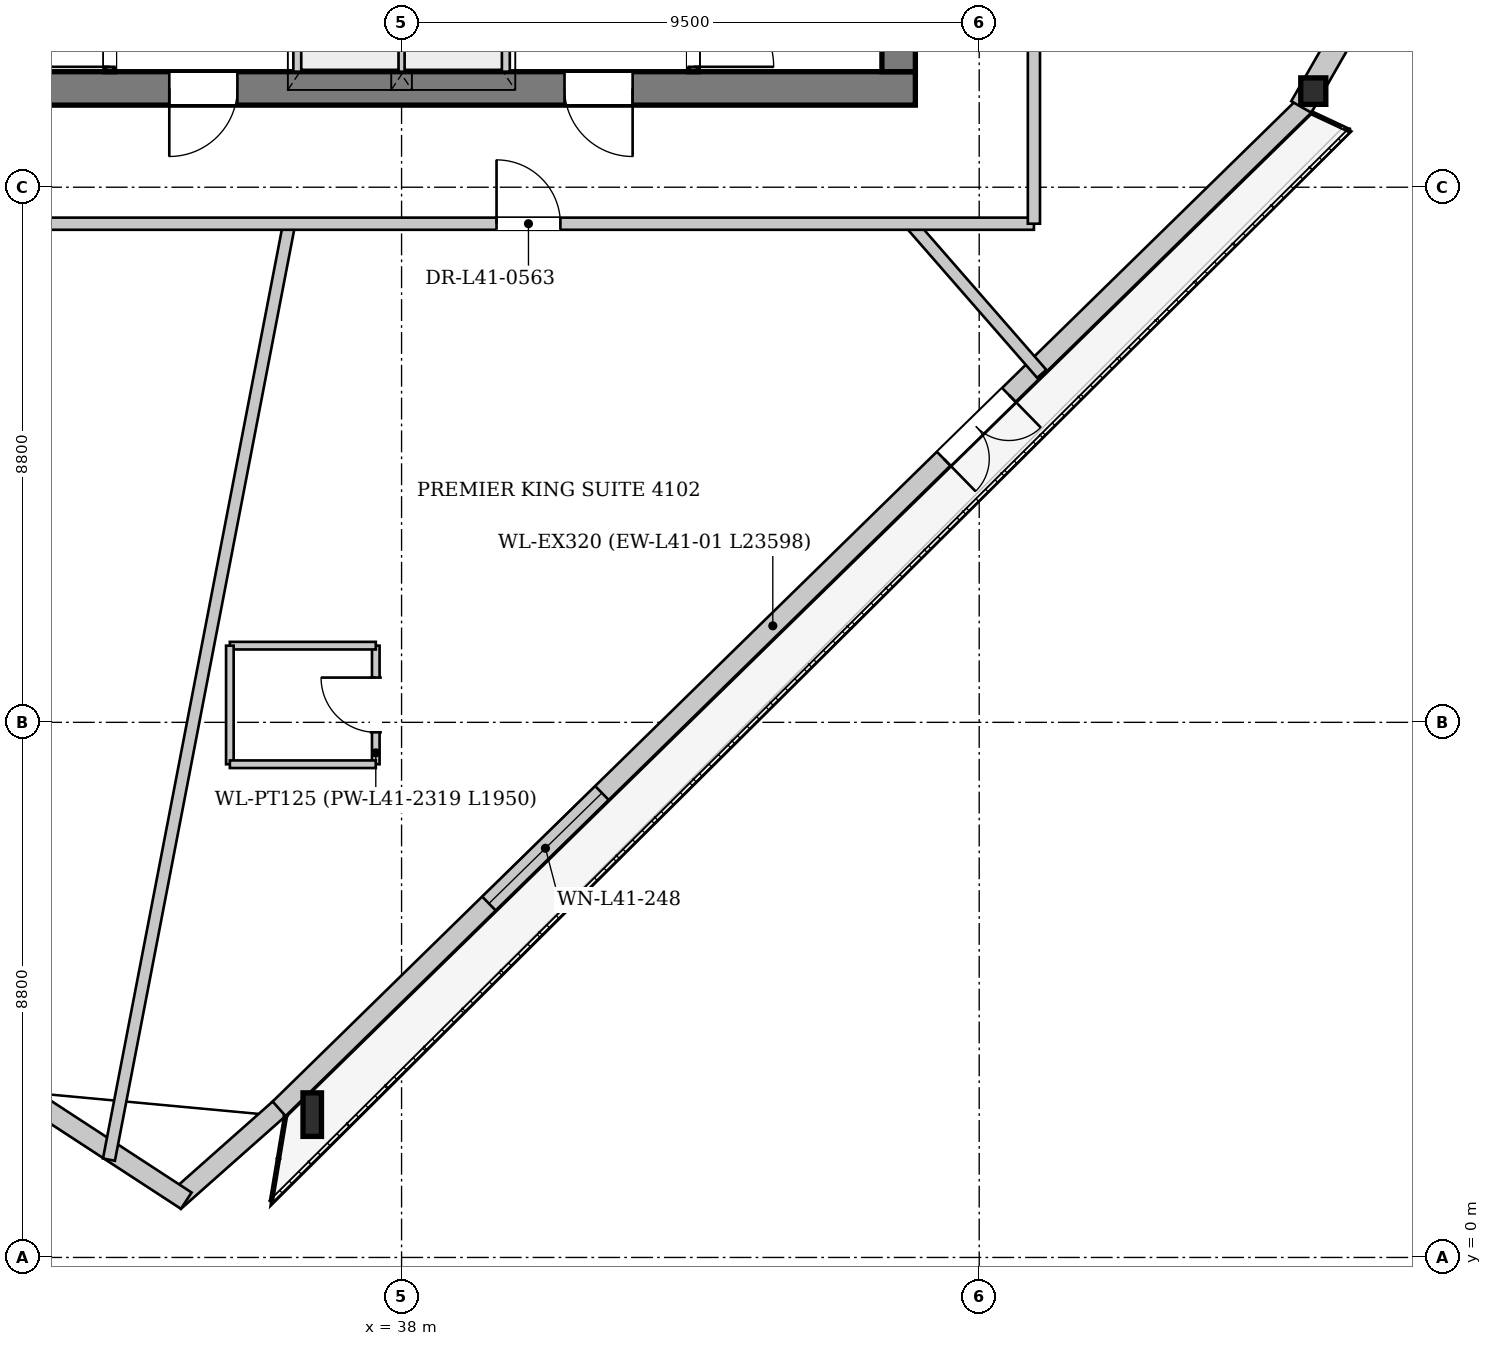
"""IFC4 building model, lengths in metres.
Left out: names, types, materials, properties, quantities, classifications, styles, units other than length and angle.
Written with IfcOpenShell. Run it as: python <this file> out.ifc"""

import sys

from ifc_helpers import new_model, si_unit, direction, frame, frame_2d, origin, origin_2d, place, context, subcontext, project, spatial, rectangle, i_section, extrude, source, transform, mapped, element, fill, save


model = new_model("IFC4")
c1 = context("Model", 3, precision=1e-05, world=origin(), true_north=direction((0.0, 1.0)))
c2 = subcontext(c1, "Body", "Model", "MODEL_VIEW")
j1 = project(units=[si_unit("LENGTHUNIT", "METRE"), si_unit("PLANEANGLEUNIT", "RADIAN")], contexts=[c1])
p1 = place(None, origin())
s1 = spatial("IfcSite", under=j1, at=p1, CompositionType="ELEMENT")
p2 = place(p1, origin())
s2 = spatial("IfcBuilding", under=s1, at=p2, CompositionType="ELEMENT")
p3 = place(p2, frame((0.0, 0.0, 157.25)))
s3 = spatial("IfcBuildingStorey", under=s2, at=p3, CompositionType="ELEMENT", Elevation=157.25)
m1 = source(origin(), c2, "Body", "SweptSolid", [
    extrude(i_section(OverallWidth=0.304, OverallDepth=0.716, WebThickness=0.021, FlangeThickness=0.04, at=origin_2d()), origin(), (0.0, 0.0, 1.0), 3.538),
])
p4 = place(p3, frame((31.361, 2.764, 0.0), z_axis=(0.287715041791, -0.040372583221, 0.956864728816), x_axis=(0.138960020448, 0.990297991878, 0.0)))
e1 = element("IfcColumn", 1, at=p4, inside=s3, PredefinedType="COLUMN", context=c2, shape_type="MappedRepresentation", body=[
    mapped(m1, transform((0.0, 0.0, 0.0), x_axis=(1.0, 0.0, 0.0), y_axis=(0.0, 1.0, 0.0), z_axis=(0.0, 0.0, 1.0), scale=1.0)),
])
m2 = source(origin(), c2, "Body", "SweptSolid", [
    extrude(i_section(OverallWidth=0.304, OverallDepth=0.716, WebThickness=0.021, FlangeThickness=0.04, at=origin_2d()), origin(), (0.0, 0.0, 1.0), 3.497),
])
p5 = place(p3, frame((36.092, 2.325, 0.0), z_axis=(0.251028780295, 0.013542709504, 0.967884882867), x_axis=(-0.05387049459, 0.998547930654, 0.0)))
e2 = element("IfcColumn", 2, at=p5, inside=s3, PredefinedType="COLUMN", context=c2, shape_type="MappedRepresentation", body=[
    mapped(m2, transform((0.0, 0.0, 0.0), x_axis=(1.0, 0.0, 0.0), y_axis=(0.0, 1.0, 0.0), z_axis=(0.0, 0.0, 1.0), scale=1.0)),
])
m3 = source(origin(), c2, "Body", "SweptSolid", [
    extrude(i_section(OverallWidth=0.412, OverallDepth=0.435, WebThickness=0.031, FlangeThickness=0.05, at=origin_2d()), origin(), (0.0, 0.0, 1.0), 3.459),
])
p6 = place(p3, frame((52.962, 18.826, 0.0), z_axis=(0.018843973792, 0.205166411286, 0.978545680248), x_axis=(-0.995808540484, 0.091462291128, 0.0)))
e3 = element("IfcColumn", 3, at=p6, inside=s3, PredefinedType="COLUMN", context=c2, shape_type="MappedRepresentation", body=[
    mapped(m3, transform((0.0, 0.0, 0.0), x_axis=(1.0, 0.0, 0.0), y_axis=(0.0, 1.0, 0.0), z_axis=(0.0, 0.0, 1.0), scale=1.0)),
])
p7 = place(p3, frame((52.85, 18.94, 0.0), z_axis=(0.0, 0.0, 1.0), x_axis=(-0.714884953244, -0.699242092287, 0.0)))
e4 = element("IfcWall", 4, at=p7, inside=s3, PredefinedType="SOLIDWALL", context=c2, shape_type="SweptSolid", body=[
    extrude(rectangle(XDim=23.598, YDim=0.32, at=frame_2d((11.799, 0.0))), origin(), (0.0, 0.0, 1.0), 2.722),
])
p8 = place(p7, frame((6.801, 0.0, 0.0)))
e5 = element("IfcOpeningElement", 5, at=p8, cuts=e4, PredefinedType="OPENING", context=c2, shape_type="SweptSolid", body=[
    extrude(rectangle(XDim=1.5, YDim=2.3, at=frame_2d((0.75, 1.15))), frame((0.0, 0.17, 0.0), z_axis=(0.0, -1.0, 0.0), x_axis=(1.0, 0.0, 0.0)), (0.0, 0.0, 1.0), 0.34),
])
p9 = place(p7, frame((16.163, 0.0, 0.252)))
e6 = element("IfcOpeningElement", 6, at=p9, cuts=e4, PredefinedType="OPENING", context=c2, shape_type="SweptSolid", body=[
    extrude(rectangle(XDim=2.6, YDim=2.35, at=frame_2d((1.3, 1.175))), frame((0.0, 0.17, 0.0), z_axis=(0.0, -1.0, 0.0), x_axis=(1.0, 0.0, 0.0)), (0.0, 0.0, 1.0), 0.34),
])
p10 = place(p3, frame((35.986, 2.445, 0.0), z_axis=(0.0, 0.0, 1.0), x_axis=(-0.748310994166, -0.663348065506, 0.0)))
e7 = element("IfcWall", 7, at=p10, inside=s3, PredefinedType="SOLIDWALL", context=c2, shape_type="SweptSolid", body=[
    extrude(rectangle(XDim=2.299, YDim=0.32, at=frame_2d((1.149, 0.0))), origin(), (0.0, 0.0, 1.0), 2.722),
])
p11 = place(p3, frame((34.459, 0.934, 0.0), z_axis=(0.0, 0.0, 1.0), x_axis=(-0.837598435758, 0.546286427084, 0.0)))
e8 = element("IfcWall", 8, at=p11, inside=s3, PredefinedType="SOLIDWALL", context=c2, shape_type="SweptSolid", body=[
    extrude(rectangle(XDim=3.594, YDim=0.32, at=frame_2d((1.797, 0.0))), origin(), (0.0, 0.0, 1.0), 2.722),
])
p12 = place(p3, frame((64.549, 39.384, 0.0), z_axis=(0.0, 0.0, 1.0), x_axis=(-0.49798956696, -0.867183020589, 0.0)))
e9 = element("IfcWall", 9, at=p12, inside=s3, PredefinedType="SOLIDWALL", context=c2, shape_type="SweptSolid", body=[
    extrude(rectangle(XDim=23.598, YDim=0.38, at=frame_2d((11.799, 0.0))), origin(), (0.0, 0.0, 1.0), 2.722),
])
p13 = place(p12, frame((5.507, 0.0, 0.352)))
e10 = element("IfcOpeningElement", 10, at=p13, cuts=e9, PredefinedType="OPENING", context=c2, shape_type="SweptSolid", body=[
    extrude(rectangle(XDim=2.2, YDim=2.25, at=frame_2d((1.1, 1.125))), frame((0.0, 0.2, 0.0), z_axis=(0.0, -1.0, 0.0), x_axis=(1.0, 0.0, 0.0)), (0.0, 0.0, 1.0), 0.4),
])
p14 = place(p12, frame((15.891, 0.0, 0.352)))
e11 = element("IfcOpeningElement", 11, at=p14, cuts=e9, PredefinedType="OPENING", context=c2, shape_type="SweptSolid", body=[
    extrude(rectangle(XDim=2.2, YDim=2.25, at=frame_2d((1.1, 1.125))), frame((0.0, 0.2, 0.0), z_axis=(0.0, -1.0, 0.0), x_axis=(1.0, 0.0, 0.0)), (0.0, 0.0, 1.0), 0.4),
])
p15 = place(p3, frame((46.45, 19.225, 0.0), z_axis=(0.0, 0.0, 1.0), x_axis=(-1.0, 0.0, 0.0)))
e12 = element("IfcWall", 12, at=p15, inside=s3, PredefinedType="SHEAR", context=c2, shape_type="SweptSolid", body=[
    extrude(rectangle(XDim=16.9, YDim=0.55, at=frame_2d((8.45, 0.0))), origin(), (0.0, 0.0, 1.0), 3.33),
])
p16 = place(p15, frame((4.65, 0.0, 0.0)))
e13 = element("IfcOpeningElement", 13, at=p16, cuts=e12, PredefinedType="OPENING", context=c2, shape_type="SweptSolid", body=[
    extrude(rectangle(XDim=1.12, YDim=2.25, at=frame_2d((0.56, 1.125))), frame((0.0, 0.285, 0.0), z_axis=(0.0, -1.0, 0.0), x_axis=(1.0, 0.0, 0.0)), (0.0, 0.0, 1.0), 0.57),
])
p17 = place(p15, frame((11.15, 0.0, 0.0)))
e14 = element("IfcOpeningElement", 14, at=p17, cuts=e12, PredefinedType="OPENING", context=c2, shape_type="SweptSolid", body=[
    extrude(rectangle(XDim=1.12, YDim=2.25, at=frame_2d((0.56, 1.125))), frame((0.0, 0.285, 0.0), z_axis=(0.0, -1.0, 0.0), x_axis=(1.0, 0.0, 0.0)), (0.0, 0.0, 1.0), 0.57),
])
p18 = place(p3, frame((46.175, 33.7, 0.0), z_axis=(0.0, 0.0, 1.0), x_axis=(0.0, -1.0, 0.0)))
e15 = element("IfcWall", 15, at=p18, inside=s3, PredefinedType="SHEAR", context=c2, shape_type="SweptSolid", body=[
    extrude(rectangle(XDim=14.2, YDim=0.55, at=frame_2d((7.1, 0.0))), origin(), (0.0, 0.0, 1.0), 3.33),
])
p19 = place(p18, frame((5.18, 0.0, 0.0)))
e16 = element("IfcOpeningElement", 16, at=p19, cuts=e15, PredefinedType="OPENING", context=c2, shape_type="SweptSolid", body=[
    extrude(rectangle(XDim=1.6, YDim=2.2, at=frame_2d((0.8, 1.1))), frame((0.0, 0.285, 0.0), z_axis=(0.0, -1.0, 0.0), x_axis=(1.0, 0.0, 0.0)), (0.0, 0.0, 1.0), 0.57),
])
p20 = place(p18, frame((2.05, 0.0, 0.0)))
e17 = element("IfcOpeningElement", 17, at=p20, cuts=e15, PredefinedType="OPENING", context=c2, shape_type="SweptSolid", body=[
    extrude(rectangle(XDim=0.95, YDim=2.1, at=frame_2d((0.475, 1.05))), frame((0.0, 0.285, 0.0), z_axis=(0.0, -1.0, 0.0), x_axis=(1.0, 0.0, 0.0)), (0.0, 0.0, 1.0), 0.57),
])
p21 = place(p3, frame((33.2, 19.5, 0.0), z_axis=(0.0, 0.0, 1.0), x_axis=(0.0, 1.0, 0.0)))
e18 = element("IfcWall", 18, at=p21, inside=s3, PredefinedType="PARTITIONING", context=c2, shape_type="SweptSolid", body=[
    extrude(rectangle(XDim=7.46, YDim=0.16, at=frame_2d((3.73, 0.0))), origin(), (0.0, 0.0, 1.0), 3.33),
])
p22 = place(p21, frame((0.08, 0.0, 0.0)))
e19 = element("IfcOpeningElement", 19, at=p22, cuts=e18, PredefinedType="OPENING", context=c2, shape_type="SweptSolid", body=[
    extrude(rectangle(XDim=1.32, YDim=2.2, at=frame_2d((0.66, 1.1))), frame((0.0, 0.09, 0.0), z_axis=(0.0, -1.0, 0.0), x_axis=(1.0, 0.0, 0.0)), (0.0, 0.0, 1.0), 0.18),
])
p23 = place(p3, frame((42.8, 26.96, 0.0), z_axis=(0.0, 0.0, 1.0), x_axis=(0.0, -1.0, 0.0)))
e20 = element("IfcWall", 20, at=p23, inside=s3, PredefinedType="PARTITIONING", context=c2, shape_type="SweptSolid", body=[
    extrude(rectangle(XDim=7.46, YDim=0.16, at=frame_2d((3.73, 0.0))), origin(), (0.0, 0.0, 1.0), 3.33),
])
p24 = place(p23, frame((6.06, 0.0, 0.0)))
e21 = element("IfcOpeningElement", 21, at=p24, cuts=e20, PredefinedType="OPENING", context=c2, shape_type="SweptSolid", body=[
    extrude(rectangle(XDim=1.32, YDim=2.2, at=frame_2d((0.66, 1.1))), frame((0.0, 0.09, 0.0), z_axis=(0.0, -1.0, 0.0), x_axis=(1.0, 0.0, 0.0)), (0.0, 0.0, 1.0), 0.18),
])
p25 = place(p3, frame((36.3, 19.5, 0.0), z_axis=(0.0, 0.0, 1.0), x_axis=(0.0, 1.0, 0.0)))
e22 = element("IfcWall", 22, at=p25, inside=s3, PredefinedType="PARTITIONING", context=c2, shape_type="SweptSolid", body=[
    extrude(rectangle(XDim=4.78, YDim=0.16, at=frame_2d((2.39, 0.0))), origin(), (0.0, 0.0, 1.0), 3.33),
])
p26 = place(p25, frame((0.6, 0.0, 0.0)))
e23 = element("IfcOpeningElement", 23, at=p26, cuts=e22, PredefinedType="OPENING", context=c2, shape_type="SweptSolid", body=[
    extrude(rectangle(XDim=1.2, YDim=2.2, at=frame_2d((0.6, 1.1))), frame((0.0, 0.09, 0.0), z_axis=(0.0, -1.0, 0.0), x_axis=(1.0, 0.0, 0.0)), (0.0, 0.0, 1.0), 0.18),
])
p27 = place(p25, frame((2.65, 0.0, 0.0)))
e24 = element("IfcOpeningElement", 24, at=p27, cuts=e22, PredefinedType="OPENING", context=c2, shape_type="SweptSolid", body=[
    extrude(rectangle(XDim=0.95, YDim=2.1, at=frame_2d((0.475, 1.05))), frame((0.0, 0.09, 0.0), z_axis=(0.0, -1.0, 0.0), x_axis=(1.0, 0.0, 0.0)), (0.0, 0.0, 1.0), 0.18),
])
p28 = place(p3, frame((39.7, 24.28, 0.0), z_axis=(0.0, 0.0, 1.0), x_axis=(0.0, -1.0, 0.0)))
e25 = element("IfcWall", 25, at=p28, inside=s3, PredefinedType="PARTITIONING", context=c2, shape_type="SweptSolid", body=[
    extrude(rectangle(XDim=4.78, YDim=0.16, at=frame_2d((2.39, 0.0))), origin(), (0.0, 0.0, 1.0), 3.33),
])
p29 = place(p28, frame((3.12, 0.0, 0.0)))
e26 = element("IfcOpeningElement", 26, at=p29, cuts=e25, PredefinedType="OPENING", context=c2, shape_type="SweptSolid", body=[
    extrude(rectangle(XDim=1.2, YDim=2.2, at=frame_2d((0.6, 1.1))), frame((0.0, 0.09, 0.0), z_axis=(0.0, -1.0, 0.0), x_axis=(1.0, 0.0, 0.0)), (0.0, 0.0, 1.0), 0.18),
])
p30 = place(p3, frame((38.0, 19.5, 0.0), z_axis=(0.0, 0.0, 1.0), x_axis=(0.0, 1.0, 0.0)))
e27 = element("IfcWall", 27, at=p30, inside=s3, PredefinedType="PARTITIONING", context=c2, shape_type="SweptSolid", body=[
    extrude(rectangle(XDim=2.46, YDim=0.125, at=frame_2d((1.23, 0.0))), origin(), (0.0, 0.0, 1.0), 3.33),
])
p31 = place(p3, frame((36.151, 17.0, 0.0), z_axis=(0.0, 0.0, 1.0), x_axis=(-0.189090023501, -0.98195975631, 0.0)))
e28 = element("IfcWall", 28, at=p31, inside=s3, PredefinedType="PARTITIONING", context=c2, shape_type="SweptSolid", body=[
    extrude(rectangle(XDim=15.674, YDim=0.2, at=frame_2d((7.837, 0.0))), origin(), (0.0, 0.0, 1.0), 3.33),
])
p32 = place(p3, frame((46.375, 17.0, 0.0), z_axis=(0.0, 0.0, 1.0), x_axis=(0.657406566199, -0.753536068625, 0.0)))
e29 = element("IfcWall", 29, at=p32, inside=s3, PredefinedType="PARTITIONING", context=c2, shape_type="SweptSolid", body=[
    extrude(rectangle(XDim=3.276, YDim=0.2, at=frame_2d((1.638, 0.0))), origin(), (0.0, 0.0, 1.0), 3.33),
])
p33 = place(p3, frame((37.576, 8.111, 0.0), z_axis=(0.0, 0.0, 1.0), x_axis=(0.0, 1.0, 0.0)))
e30 = element("IfcWall", 30, at=p33, inside=s3, PredefinedType="PARTITIONING", context=c2, shape_type="SweptSolid", body=[
    extrude(rectangle(XDim=1.95, YDim=0.125, at=frame_2d((0.975, 0.0))), origin(), (0.0, 0.0, 1.0), 3.33),
])
p34 = place(p33, frame((0.525, 0.0, 0.0)))
e31 = element("IfcOpeningElement", 31, at=p34, cuts=e30, PredefinedType="OPENING", context=c2, shape_type="SweptSolid", body=[
    extrude(rectangle(XDim=0.9, YDim=2.1, at=frame_2d((0.45, 1.05))), frame((0.0, 0.073, 0.0), z_axis=(0.0, -1.0, 0.0), x_axis=(1.0, 0.0, 0.0)), (0.0, 0.0, 1.0), 0.145),
])
p35 = place(p3, frame((37.576, 10.061, 0.0), z_axis=(0.0, 0.0, 1.0), x_axis=(-1.0, 0.0, 0.0)))
e32 = element("IfcWall", 32, at=p35, inside=s3, PredefinedType="PARTITIONING", context=c2, shape_type="SweptSolid", body=[
    extrude(rectangle(XDim=2.4, YDim=0.125, at=frame_2d((1.2, 0.0))), origin(), (0.0, 0.0, 1.0), 3.33),
])
p36 = place(p3, frame((35.176, 10.061, 0.0), z_axis=(0.0, 0.0, 1.0), x_axis=(0.0, -1.0, 0.0)))
e33 = element("IfcWall", 33, at=p36, inside=s3, PredefinedType="PARTITIONING", context=c2, shape_type="SweptSolid", body=[
    extrude(rectangle(XDim=1.95, YDim=0.125, at=frame_2d((0.975, 0.0))), origin(), (0.0, 0.0, 1.0), 3.33),
])
p37 = place(p3, frame((35.176, 8.111, 0.0), z_axis=(0.0, 0.0, 1.0), x_axis=(1.0, 0.0, 0.0)))
e34 = element("IfcWall", 34, at=p37, inside=s3, PredefinedType="PARTITIONING", context=c2, shape_type="SweptSolid", body=[
    extrude(rectangle(XDim=2.4, YDim=0.125, at=frame_2d((1.2, 0.0))), origin(), (0.0, 0.0, 1.0), 3.33),
])
p38 = place(p3, frame((27.6, 17.0, 0.0), z_axis=(0.0, 0.0, 1.0), x_axis=(1.0, 0.0, 0.0)))
e35 = element("IfcWall", 35, at=p38, inside=s3, PredefinedType="PARTITIONING", context=c2, shape_type="SweptSolid", body=[
    extrude(rectangle(XDim=20.8, YDim=0.2, at=frame_2d((10.4, 0.0))), origin(), (0.0, 0.0, 1.0), 3.33),
])
p39 = place(p38, frame((0.3, 0.0, 0.0)))
e36 = element("IfcOpeningElement", 36, at=p39, cuts=e35, PredefinedType="OPENING", context=c2, shape_type="SweptSolid", body=[
    extrude(rectangle(XDim=1.05, YDim=2.2, at=frame_2d((0.525, 1.1))), frame((0.0, 0.11, 0.0), z_axis=(0.0, -1.0, 0.0), x_axis=(1.0, 0.0, 0.0)), (0.0, 0.0, 1.0), 0.22),
])
p40 = place(p38, frame((11.962, 0.0, 0.0)))
e37 = element("IfcOpeningElement", 37, at=p40, cuts=e35, PredefinedType="OPENING", context=c2, shape_type="SweptSolid", body=[
    extrude(rectangle(XDim=1.05, YDim=2.2, at=frame_2d((0.525, 1.1))), frame((0.0, 0.11, 0.0), z_axis=(0.0, -1.0, 0.0), x_axis=(1.0, 0.0, 0.0)), (0.0, 0.0, 1.0), 0.22),
])
p41 = place(p3, frame((48.4, 17.0, 0.0), z_axis=(0.0, 0.0, 1.0), x_axis=(0.0, 1.0, 0.0)))
e38 = element("IfcWall", 38, at=p41, inside=s3, PredefinedType="PARTITIONING", context=c2, shape_type="SweptSolid", body=[
    extrude(rectangle(XDim=19.2, YDim=0.2, at=frame_2d((9.6, 0.0))), origin(), (0.0, 0.0, 1.0), 3.33),
])
p42 = place(p41, frame((3.765, 0.0, 0.0)))
e39 = element("IfcOpeningElement", 39, at=p42, cuts=e38, PredefinedType="OPENING", context=c2, shape_type="SweptSolid", body=[
    extrude(rectangle(XDim=1.05, YDim=2.2, at=frame_2d((0.525, 1.1))), frame((0.0, 0.11, 0.0), z_axis=(0.0, -1.0, 0.0), x_axis=(1.0, 0.0, 0.0)), (0.0, 0.0, 1.0), 0.22),
])
p43 = place(p41, frame((14.06, 0.0, 0.0)))
e40 = element("IfcOpeningElement", 40, at=p43, cuts=e38, PredefinedType="OPENING", context=c2, shape_type="SweptSolid", body=[
    extrude(rectangle(XDim=1.05, YDim=2.2, at=frame_2d((0.525, 1.1))), frame((0.0, 0.11, 0.0), z_axis=(0.0, -1.0, 0.0), x_axis=(1.0, 0.0, 0.0)), (0.0, 0.0, 1.0), 0.22),
])
m4 = source(origin(), c2, "Body", "SweptSolid", [
    extrude(rectangle(XDim=1.5, YDim=2.3, at=frame_2d((0.75, 1.15))), frame((0.0, 0.025, 0.0), z_axis=(0.0, -1.0, 0.0), x_axis=(1.0, 0.0, 0.0)), (0.0, 0.0, 1.0), 0.05),
])
p44 = place(p8, origin())
e41 = element("IfcDoor", 41, at=p44, inside=s3, OperationType="DOUBLE_DOOR_SINGLE_SWING", PredefinedType="DOOR", context=c2, shape_type="MappedRepresentation", body=[
    mapped(m4, transform((0.0, 0.0, 0.0), x_axis=(1.0, 0.0, 0.0), y_axis=(0.0, 1.0, 0.0), z_axis=(0.0, 0.0, 1.0), scale=1.0)),
])
fill(e5, e41)
m5 = source(origin(), c2, "Body", "SweptSolid", [
    extrude(rectangle(XDim=2.6, YDim=2.35, at=frame_2d((1.3, 1.175))), frame((0.0, 0.03, 0.0), z_axis=(0.0, -1.0, 0.0), x_axis=(1.0, 0.0, 0.0)), (0.0, 0.0, 1.0), 0.06),
])
p45 = place(p9, origin())
e42 = element("IfcWindow", 42, at=p45, inside=s3, PartitioningType="SINGLE_PANEL", PredefinedType="WINDOW", context=c2, shape_type="MappedRepresentation", body=[
    mapped(m5, transform((0.0, 0.0, 0.0), x_axis=(1.0, 0.0, 0.0), y_axis=(0.0, 1.0, 0.0), z_axis=(0.0, 0.0, 1.0), scale=1.0)),
])
fill(e6, e42)
m6 = source(origin(), c2, "Body", "SweptSolid", [
    extrude(rectangle(XDim=1.12, YDim=2.25, at=frame_2d((0.56, 1.125))), frame((0.0, 0.025, 0.0), z_axis=(0.0, -1.0, 0.0), x_axis=(1.0, 0.0, 0.0)), (0.0, 0.0, 1.0), 0.05),
])
p46 = place(p16, origin())
e43 = element("IfcDoor", 43, at=p46, inside=s3, OperationType="SINGLE_SWING_LEFT", PredefinedType="DOOR", context=c2, shape_type="MappedRepresentation", body=[
    mapped(m6, transform((0.0, 0.0, 0.0), x_axis=(1.0, 0.0, 0.0), y_axis=(0.0, 1.0, 0.0), z_axis=(0.0, 0.0, 1.0), scale=1.0)),
])
fill(e13, e43)
p47 = place(p17, origin())
e44 = element("IfcDoor", 44, at=p47, inside=s3, OperationType="SINGLE_SWING_RIGHT", PredefinedType="DOOR", context=c2, shape_type="MappedRepresentation", body=[
    mapped(m6, transform((0.0, 0.0, 0.0), x_axis=(1.0, 0.0, 0.0), y_axis=(0.0, 1.0, 0.0), z_axis=(0.0, 0.0, 1.0), scale=1.0)),
])
fill(e14, e44)
m7 = source(origin(), c2, "Body", "SweptSolid", [
    extrude(rectangle(XDim=1.32, YDim=2.2, at=frame_2d((0.66, 1.1))), frame((0.0, 0.025, 0.0), z_axis=(0.0, -1.0, 0.0), x_axis=(1.0, 0.0, 0.0)), (0.0, 0.0, 1.0), 0.05),
])
p48 = place(p22, origin())
e45 = element("IfcDoor", 45, at=p48, inside=s3, OperationType="SINGLE_SWING_LEFT", PredefinedType="DOOR", context=c2, shape_type="MappedRepresentation", body=[
    mapped(m7, transform((0.0, 0.0, 0.0), x_axis=(1.0, 0.0, 0.0), y_axis=(0.0, 1.0, 0.0), z_axis=(0.0, 0.0, 1.0), scale=1.0)),
])
fill(e19, e45)
p49 = place(p24, origin())
e46 = element("IfcDoor", 46, at=p49, inside=s3, OperationType="SINGLE_SWING_RIGHT", PredefinedType="DOOR", context=c2, shape_type="MappedRepresentation", body=[
    mapped(m7, transform((0.0, 0.0, 0.0), x_axis=(1.0, 0.0, 0.0), y_axis=(0.0, 1.0, 0.0), z_axis=(0.0, 0.0, 1.0), scale=1.0)),
])
fill(e21, e46)
m8 = source(origin(), c2, "Body", "SweptSolid", [
    extrude(rectangle(XDim=0.9, YDim=2.1, at=frame_2d((0.45, 1.05))), frame((0.0, 0.025, 0.0), z_axis=(0.0, -1.0, 0.0), x_axis=(1.0, 0.0, 0.0)), (0.0, 0.0, 1.0), 0.05),
])
p50 = place(p34, origin())
e47 = element("IfcDoor", 47, at=p50, inside=s3, OperationType="SINGLE_SWING_RIGHT", PredefinedType="DOOR", context=c2, shape_type="MappedRepresentation", body=[
    mapped(m8, transform((0.0, 0.0, 0.0), x_axis=(1.0, 0.0, 0.0), y_axis=(0.0, 1.0, 0.0), z_axis=(0.0, 0.0, 1.0), scale=1.0)),
])
fill(e31, e47)
m9 = source(origin(), c2, "Body", "SweptSolid", [
    extrude(rectangle(XDim=1.05, YDim=2.2, at=frame_2d((0.525, 1.1))), frame((0.0, 0.025, 0.0), z_axis=(0.0, -1.0, 0.0), x_axis=(1.0, 0.0, 0.0)), (0.0, 0.0, 1.0), 0.05),
])
p51 = place(p40, origin())
e48 = element("IfcDoor", 48, at=p51, inside=s3, OperationType="SINGLE_SWING_LEFT", PredefinedType="DOOR", context=c2, shape_type="MappedRepresentation", body=[
    mapped(m9, transform((0.0, 0.0, 0.0), x_axis=(1.0, 0.0, 0.0), y_axis=(0.0, 1.0, 0.0), z_axis=(0.0, 0.0, 1.0), scale=1.0)),
])
fill(e37, e48)
save(model, sys.argv[1])
